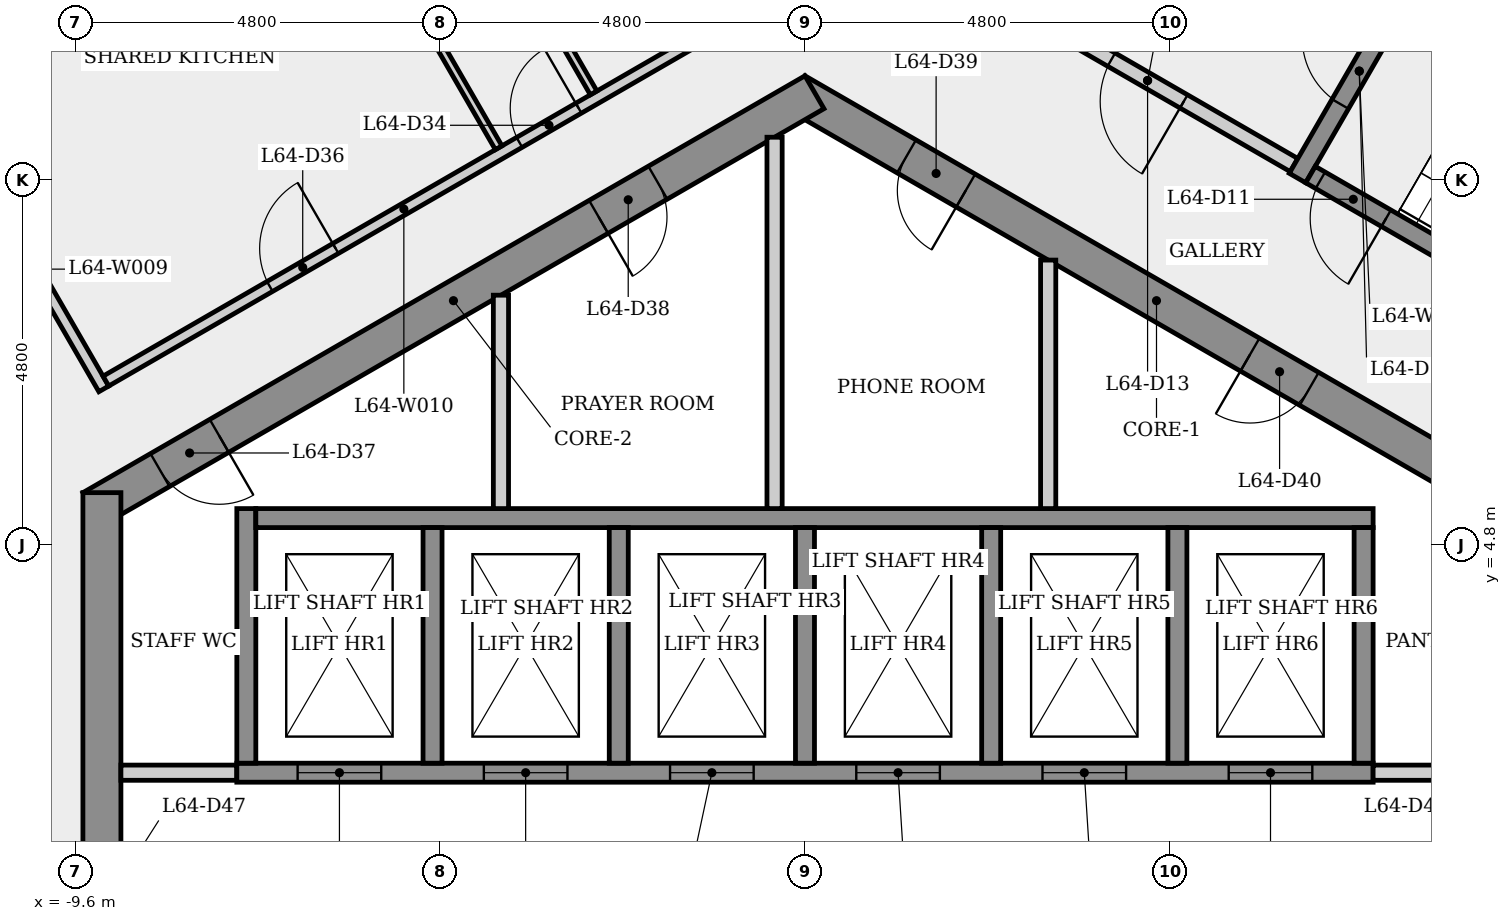
"""IFC4 building model, lengths in metres.
Left out: names, types, materials, properties, quantities, classifications, styles, units other than length and angle.
Written with IfcOpenShell. Run it as: python <this file> out.ifc"""

import sys

from ifc_helpers import new_model, si_unit, direction, frame, frame_2d, origin, place, context, subcontext, project, spatial, rectangle, extrude, element, fill, save


model = new_model("IFC4")
c1 = context("Model", 3, precision=1e-05, world=origin(), true_north=direction((0.0, 1.0)))
c2 = subcontext(c1, "Body", "Model", "MODEL_VIEW")
j1 = project(units=[si_unit("LENGTHUNIT", "METRE"), si_unit("PLANEANGLEUNIT", "RADIAN")], contexts=[c1])
p1 = place(None, origin())
s1 = spatial("IfcSite", under=j1, at=p1, CompositionType="ELEMENT")
p2 = place(p1, origin())
s2 = spatial("IfcBuilding", under=s1, at=p2, CompositionType="ELEMENT")
p3 = place(p2, frame((0.0, 0.0, 239.3)))
s3 = spatial("IfcBuildingStorey", under=s2, at=p3, CompositionType="ELEMENT", Elevation=239.3)
p4 = place(p3, frame((9.375, 5.268, 0.0), z_axis=(0.0, 0.0, 1.0), x_axis=(-0.866023993627, 0.500002442456, 0.0)))
e1 = element("IfcWall", 1, at=p4, inside=s3, PredefinedType="SHEAR", context=c2, shape_type="SweptSolid", body=[
    extrude(rectangle(XDim=10.97, YDim=0.5, at=frame_2d((5.485, 0.0))), origin(), (0.0, 0.0, 1.0), 3.4),
])
p5 = place(p4, frame((8.383, 0.0, 0.0)))
e2 = element("IfcOpeningElement", 2, at=p5, cuts=e1, PredefinedType="OPENING", context=c2, shape_type="SweptSolid", body=[
    extrude(rectangle(XDim=0.9, YDim=2.1, at=frame_2d((0.45, 1.05))), frame((0.0, 0.26, 0.0), z_axis=(0.0, -1.0, 0.0), x_axis=(1.0, 0.0, 0.0)), (0.0, 0.0, 1.0), 0.52),
])
p6 = place(p4, frame((3.165, 0.0, 0.0)))
e3 = element("IfcOpeningElement", 3, at=p6, cuts=e1, PredefinedType="OPENING", context=c2, shape_type="SweptSolid", body=[
    extrude(rectangle(XDim=0.9, YDim=2.1, at=frame_2d((0.45, 1.05))), frame((0.0, 0.26, 0.0), z_axis=(0.0, -1.0, 0.0), x_axis=(1.0, 0.0, 0.0)), (0.0, 0.0, 1.0), 0.52),
])
p7 = place(p3, frame((0.125, 10.753, 0.0), z_axis=(0.0, 0.0, 1.0), x_axis=(-0.866023993627, -0.500002442456, 0.0)))
e4 = element("IfcWall", 4, at=p7, inside=s3, PredefinedType="SHEAR", context=c2, shape_type="SweptSolid", body=[
    extrude(rectangle(XDim=10.97, YDim=0.5, at=frame_2d((5.485, 0.0))), origin(), (0.0, 0.0, 1.0), 3.4),
])
p8 = place(p7, frame((9.043, 0.0, 0.0)))
e5 = element("IfcOpeningElement", 5, at=p8, cuts=e4, PredefinedType="OPENING", context=c2, shape_type="SweptSolid", body=[
    extrude(rectangle(XDim=0.9, YDim=2.1, at=frame_2d((0.45, 1.05))), frame((0.0, 0.26, 0.0), z_axis=(0.0, -1.0, 0.0), x_axis=(1.0, 0.0, 0.0)), (0.0, 0.0, 1.0), 0.52),
])
p9 = place(p7, frame((2.38, 0.0, 0.0)))
e6 = element("IfcOpeningElement", 6, at=p9, cuts=e4, PredefinedType="OPENING", context=c2, shape_type="SweptSolid", body=[
    extrude(rectangle(XDim=0.9, YDim=2.1, at=frame_2d((0.45, 1.05))), frame((0.0, 0.26, 0.0), z_axis=(0.0, -1.0, 0.0), x_axis=(1.0, 0.0, 0.0)), (0.0, 0.0, 1.0), 0.52),
])
p10 = place(p3, frame((-9.25, 5.485, 0.0), z_axis=(0.0, 0.0, 1.0), x_axis=(0.0, -1.0, 0.0)))
e7 = element("IfcWall", 7, at=p10, inside=s3, PredefinedType="SHEAR", context=c2, shape_type="SweptSolid", body=[
    extrude(rectangle(XDim=10.97, YDim=0.5, at=frame_2d((5.485, 0.0))), origin(), (0.0, 0.0, 1.0), 3.4),
])
p11 = place(p10, frame((8.51, 0.0, 0.0)))
e8 = element("IfcOpeningElement", 8, at=p11, cuts=e7, PredefinedType="OPENING", context=c2, shape_type="SweptSolid", body=[
    extrude(rectangle(XDim=0.9, YDim=2.1, at=frame_2d((0.45, 1.05))), frame((0.0, 0.26, 0.0), z_axis=(0.0, -1.0, 0.0), x_axis=(1.0, 0.0, 0.0)), (0.0, 0.0, 1.0), 0.52),
])
p12 = place(p10, frame((4.685, 0.0, 0.0)))
e9 = element("IfcOpeningElement", 9, at=p12, cuts=e7, PredefinedType="OPENING", context=c2, shape_type="SweptSolid", body=[
    extrude(rectangle(XDim=1.6, YDim=2.1, at=frame_2d((0.8, 1.05))), frame((0.0, 0.26, 0.0), z_axis=(0.0, -1.0, 0.0), x_axis=(1.0, 0.0, 0.0)), (0.0, 0.0, 1.0), 0.52),
])
p13 = place(p3, frame((-11.044, 10.001, 0.0), z_axis=(0.0, 0.0, 1.0), x_axis=(0.500007048974, -0.866021334019, 0.0)))
e10 = element("IfcWall", 10, at=p13, inside=s3, PredefinedType="PARTITIONING", context=c2, shape_type="SweptSolid", body=[
    extrude(rectangle(XDim=3.639, YDim=0.15, at=frame_2d((1.819, 0.0))), origin(), (0.0, 0.0, 1.0), 3.05),
])
p14 = place(p3, frame((-9.198, 6.953, 0.0), z_axis=(0.0, 0.0, 1.0), x_axis=(0.866018971722, 0.500011140494, 0.0)))
e11 = element("IfcWall", 11, at=p14, inside=s3, PredefinedType="PARTITIONING", context=c2, shape_type="SweptSolid", body=[
    extrude(rectangle(XDim=9.053, YDim=0.15, at=frame_2d((4.526, 0.0))), origin(), (0.0, 0.0, 1.0), 3.05),
])
p15 = place(p14, frame((6.282, 0.0, 0.0)))
e12 = element("IfcOpeningElement", 12, at=p15, cuts=e11, PredefinedType="OPENING", context=c2, shape_type="SweptSolid", body=[
    extrude(rectangle(XDim=0.9, YDim=2.1, at=frame_2d((0.45, 1.05))), frame((0.0, 0.085, 0.0), z_axis=(0.0, -1.0, 0.0), x_axis=(1.0, 0.0, 0.0)), (0.0, 0.0, 1.0), 0.17),
])
p16 = place(p14, frame((2.49, 0.0, 0.0)))
e13 = element("IfcOpeningElement", 13, at=p16, cuts=e11, PredefinedType="OPENING", context=c2, shape_type="SweptSolid", body=[
    extrude(rectangle(XDim=1.0, YDim=2.1, at=frame_2d((0.5, 1.05))), frame((0.0, 0.085, 0.0), z_axis=(0.0, -1.0, 0.0), x_axis=(1.0, 0.0, 0.0)), (0.0, 0.0, 1.0), 0.17),
])
p17 = place(p3, frame((-9.0, 1.8, 0.0), z_axis=(0.0, 0.0, 1.0), x_axis=(1.0, 0.0, 0.0)))
e14 = element("IfcWall", 14, at=p17, inside=s3, PredefinedType="PARTITIONING", context=c2, shape_type="SweptSolid", body=[
    extrude(rectangle(XDim=1.525, YDim=0.2, at=frame_2d((0.763, 0.0))), origin(), (0.0, 0.0, 1.0), 3.05),
])
p18 = place(p3, frame((-7.475, 1.8, 0.0), z_axis=(0.0, 0.0, 1.0), x_axis=(1.0, 0.0, 0.0)))
e15 = element("IfcWall", 15, at=p18, inside=s3, PredefinedType="SHEAR", context=c2, shape_type="SweptSolid", body=[
    extrude(rectangle(XDim=14.95, YDim=0.25, at=frame_2d((7.475, 0.0))), origin(), (0.0, 0.0, 1.0), 3.05),
])
p19 = place(p18, frame((0.8, 0.0, 0.0)))
e16 = element("IfcOpeningElement", 16, at=p19, cuts=e15, PredefinedType="OPENING", context=c2, shape_type="SweptSolid", body=[
    extrude(rectangle(XDim=1.1, YDim=2.1, at=frame_2d((0.55, 1.05))), frame((0.0, 0.135, 0.0), z_axis=(0.0, -1.0, 0.0), x_axis=(1.0, 0.0, 0.0)), (0.0, 0.0, 1.0), 0.27),
])
p20 = place(p18, frame((3.25, 0.0, 0.0)))
e17 = element("IfcOpeningElement", 17, at=p20, cuts=e15, PredefinedType="OPENING", context=c2, shape_type="SweptSolid", body=[
    extrude(rectangle(XDim=1.1, YDim=2.1, at=frame_2d((0.55, 1.05))), frame((0.0, 0.135, 0.0), z_axis=(0.0, -1.0, 0.0), x_axis=(1.0, 0.0, 0.0)), (0.0, 0.0, 1.0), 0.27),
])
p21 = place(p18, frame((5.7, 0.0, 0.0)))
e18 = element("IfcOpeningElement", 18, at=p21, cuts=e15, PredefinedType="OPENING", context=c2, shape_type="SweptSolid", body=[
    extrude(rectangle(XDim=1.1, YDim=2.1, at=frame_2d((0.55, 1.05))), frame((0.0, 0.135, 0.0), z_axis=(0.0, -1.0, 0.0), x_axis=(1.0, 0.0, 0.0)), (0.0, 0.0, 1.0), 0.27),
])
p22 = place(p18, frame((8.15, 0.0, 0.0)))
e19 = element("IfcOpeningElement", 19, at=p22, cuts=e15, PredefinedType="OPENING", context=c2, shape_type="SweptSolid", body=[
    extrude(rectangle(XDim=1.1, YDim=2.1, at=frame_2d((0.55, 1.05))), frame((0.0, 0.135, 0.0), z_axis=(0.0, -1.0, 0.0), x_axis=(1.0, 0.0, 0.0)), (0.0, 0.0, 1.0), 0.27),
])
p23 = place(p18, frame((10.6, 0.0, 0.0)))
e20 = element("IfcOpeningElement", 20, at=p23, cuts=e15, PredefinedType="OPENING", context=c2, shape_type="SweptSolid", body=[
    extrude(rectangle(XDim=1.1, YDim=2.1, at=frame_2d((0.55, 1.05))), frame((0.0, 0.135, 0.0), z_axis=(0.0, -1.0, 0.0), x_axis=(1.0, 0.0, 0.0)), (0.0, 0.0, 1.0), 0.27),
])
p24 = place(p18, frame((13.05, 0.0, 0.0)))
e21 = element("IfcOpeningElement", 21, at=p24, cuts=e15, PredefinedType="OPENING", context=c2, shape_type="SweptSolid", body=[
    extrude(rectangle(XDim=1.1, YDim=2.1, at=frame_2d((0.55, 1.05))), frame((0.0, 0.135, 0.0), z_axis=(0.0, -1.0, 0.0), x_axis=(1.0, 0.0, 0.0)), (0.0, 0.0, 1.0), 0.27),
])
p25 = place(p3, frame((-7.35, 1.925, 0.0), z_axis=(0.0, 0.0, 1.0), x_axis=(0.0, 1.0, 0.0)))
e22 = element("IfcWall", 22, at=p25, inside=s3, PredefinedType="SHEAR", context=c2, shape_type="SweptSolid", body=[
    extrude(rectangle(XDim=3.35, YDim=0.25, at=frame_2d((1.675, 0.0))), origin(), (0.0, 0.0, 1.0), 3.05),
])
p26 = place(p3, frame((-7.225, 5.15, 0.0), z_axis=(0.0, 0.0, 1.0), x_axis=(1.0, 0.0, 0.0)))
e23 = element("IfcWall", 23, at=p26, inside=s3, PredefinedType="SHEAR", context=c2, shape_type="SweptSolid", body=[
    extrude(rectangle(XDim=14.7, YDim=0.25, at=frame_2d((7.35, 0.0))), origin(), (0.0, 0.0, 1.0), 3.05),
])
p27 = place(p3, frame((-4.9, 5.025, 0.0), z_axis=(0.0, 0.0, 1.0), x_axis=(0.0, -1.0, 0.0)))
e24 = element("IfcWall", 24, at=p27, inside=s3, PredefinedType="SHEAR", context=c2, shape_type="SweptSolid", body=[
    extrude(rectangle(XDim=3.1, YDim=0.25, at=frame_2d((1.55, 0.0))), origin(), (0.0, 0.0, 1.0), 3.4),
])
p28 = place(p3, frame((-4.168, 13.147, 0.0), z_axis=(0.0, 0.0, 1.0), x_axis=(0.499971228071, -0.866042014628, 0.0)))
e25 = element("IfcWall", 25, at=p28, inside=s3, PredefinedType="PARTITIONING", context=c2, shape_type="SweptSolid", body=[
    extrude(rectangle(XDim=2.775, YDim=0.1, at=frame_2d((1.388, 0.0))), origin(), (0.0, 0.0, 1.0), 3.05),
])
p29 = place(p28, frame((1.012, 0.0, 0.0)))
e26 = element("IfcOpeningElement", 26, at=p29, cuts=e25, PredefinedType="OPENING", context=c2, shape_type="SweptSolid", body=[
    extrude(rectangle(XDim=0.8, YDim=2.1, at=frame_2d((0.4, 1.05))), frame((0.0, 0.06, 0.0), z_axis=(0.0, -1.0, 0.0), x_axis=(1.0, 0.0, 0.0)), (0.0, 0.0, 1.0), 0.12),
])
p30 = place(p3, frame((-4.0, 8.083, 0.0), z_axis=(0.0, 0.0, 1.0), x_axis=(0.0, -1.0, 0.0)))
e27 = element("IfcWall", 27, at=p30, inside=s3, PredefinedType="PARTITIONING", context=c2, shape_type="SweptSolid", body=[
    extrude(rectangle(XDim=2.808, YDim=0.2, at=frame_2d((1.404, 0.0))), origin(), (0.0, 0.0, 1.0), 3.05),
])
p31 = place(p3, frame((-4.03, 10.023, 0.0), z_axis=(0.0, 0.0, 1.0), x_axis=(-0.499980681017, 0.866036557317, 0.0)))
e28 = element("IfcWall", 28, at=p31, inside=s3, PredefinedType="PARTITIONING", context=c2, shape_type="SweptSolid", body=[
    extrude(rectangle(XDim=6.193, YDim=0.1, at=frame_2d((3.096, 0.0))), origin(), (0.0, 0.0, 1.0), 3.05),
])
p32 = place(p3, frame((-2.45, 5.025, 0.0), z_axis=(0.0, 0.0, 1.0), x_axis=(0.0, -1.0, 0.0)))
e29 = element("IfcWall", 29, at=p32, inside=s3, PredefinedType="SHEAR", context=c2, shape_type="SweptSolid", body=[
    extrude(rectangle(XDim=3.1, YDim=0.25, at=frame_2d((1.55, 0.0))), origin(), (0.0, 0.0, 1.0), 3.4),
])
p33 = place(p3, frame((-0.4, 10.161, 0.0), z_axis=(0.0, 0.0, 1.0), x_axis=(0.0, -1.0, 0.0)))
e30 = element("IfcWall", 30, at=p33, inside=s3, PredefinedType="PARTITIONING", context=c2, shape_type="SweptSolid", body=[
    extrude(rectangle(XDim=4.886, YDim=0.2, at=frame_2d((2.443, 0.0))), origin(), (0.0, 0.0, 1.0), 3.05),
])
for number, where, z_axis, x_axis in (
    (31, (0.0, 5.025, 0.0), (0.0, 0.0, 1.0), (0.0, -1.0, 0.0)),
    (32, (2.45, 5.025, 0.0), (0.0, 0.0, 1.0), (0.0, -1.0, 0.0)),
):
    element("IfcWall", number, at=place(p3, frame(where, z_axis=z_axis, x_axis=x_axis)), inside=s3, PredefinedType="SHEAR", context=c2, shape_type="SweptSolid", body=[
        extrude(rectangle(XDim=3.1, YDim=0.25, at=frame_2d((1.55, 0.0))), origin(), (0.0, 0.0, 1.0), 3.4),
    ])
p34 = place(p3, frame((3.2, 8.545, 0.0), z_axis=(0.0, 0.0, 1.0), x_axis=(0.0, -1.0, 0.0)))
e33 = element("IfcWall", 33, at=p34, inside=s3, PredefinedType="PARTITIONING", context=c2, shape_type="SweptSolid", body=[
    extrude(rectangle(XDim=3.27, YDim=0.2, at=frame_2d((1.635, 0.0))), origin(), (0.0, 0.0, 1.0), 3.05),
])
p35 = place(p3, frame((4.9, 5.025, 0.0), z_axis=(0.0, 0.0, 1.0), x_axis=(0.0, -1.0, 0.0)))
e34 = element("IfcWall", 34, at=p35, inside=s3, PredefinedType="SHEAR", context=c2, shape_type="SweptSolid", body=[
    extrude(rectangle(XDim=3.1, YDim=0.25, at=frame_2d((1.55, 0.0))), origin(), (0.0, 0.0, 1.0), 3.4),
])
p36 = place(p3, frame((6.435, 9.795, 0.0), z_axis=(0.0, 0.0, 1.0), x_axis=(-0.866012907634, 0.500021643343, 0.0)))
e35 = element("IfcWall", 35, at=p36, inside=s3, PredefinedType="PARTITIONING", context=c2, shape_type="SweptSolid", body=[
    extrude(rectangle(XDim=4.45, YDim=0.2, at=frame_2d((2.225, 0.0))), origin(), (0.0, 0.0, 1.0), 3.05),
])
p37 = place(p36, frame((1.675, 0.0, 0.0)))
e36 = element("IfcOpeningElement", 36, at=p37, cuts=e35, PredefinedType="OPENING", context=c2, shape_type="SweptSolid", body=[
    extrude(rectangle(XDim=1.1, YDim=2.1, at=frame_2d((0.55, 1.05))), frame((0.0, 0.11, 0.0), z_axis=(0.0, -1.0, 0.0), x_axis=(1.0, 0.0, 0.0)), (0.0, 0.0, 1.0), 0.22),
])
p38 = place(p3, frame((6.48, 9.624, 0.0), z_axis=(0.0, 0.0, 1.0), x_axis=(0.500017246033, 0.866015446554, 0.0)))
e37 = element("IfcWall", 37, at=p38, inside=s3, PredefinedType="SHEAR", context=c2, shape_type="SweptSolid", body=[
    extrude(rectangle(XDim=3.25, YDim=0.25, at=frame_2d((1.625, 0.0))), origin(), (0.0, 0.0, 1.0), 3.05),
])
p39 = place(p38, frame((1.125, 0.0, 0.0)))
e38 = element("IfcOpeningElement", 38, at=p39, cuts=e37, PredefinedType="OPENING", context=c2, shape_type="SweptSolid", body=[
    extrude(rectangle(XDim=1.0, YDim=2.1, at=frame_2d((0.5, 1.05))), frame((0.0, 0.135, 0.0), z_axis=(0.0, -1.0, 0.0), x_axis=(1.0, 0.0, 0.0)), (0.0, 0.0, 1.0), 0.27),
])
p40 = place(p3, frame((7.475, 1.8, 0.0), z_axis=(0.0, 0.0, 1.0), x_axis=(1.0, 0.0, 0.0)))
e39 = element("IfcWall", 39, at=p40, inside=s3, PredefinedType="PARTITIONING", context=c2, shape_type="SweptSolid", body=[
    extrude(rectangle(XDim=1.525, YDim=0.2, at=frame_2d((0.763, 0.0))), origin(), (0.0, 0.0, 1.0), 3.05),
])
p41 = place(p3, frame((7.35, 5.025, 0.0), z_axis=(0.0, 0.0, 1.0), x_axis=(0.0, -1.0, 0.0)))
e40 = element("IfcWall", 40, at=p41, inside=s3, PredefinedType="SHEAR", context=c2, shape_type="SweptSolid", body=[
    extrude(rectangle(XDim=3.1, YDim=0.25, at=frame_2d((1.55, 0.0))), origin(), (0.0, 0.0, 1.0), 3.4),
])
p42 = place(p3, frame((8.151, 12.268, 0.0), z_axis=(0.0, 0.0, 1.0), x_axis=(0.866025499775, -0.499999833739, 0.0)))
e41 = element("IfcWall", 41, at=p42, inside=s3, PredefinedType="SHEAR", context=c2, shape_type="SweptSolid", body=[
    extrude(rectangle(XDim=6.4, YDim=0.25, at=frame_2d((3.2, 0.0))), origin(), (0.0, 0.0, 1.0), 3.05),
])
p43 = place(p3, frame((12.194, 6.47, 0.0), z_axis=(0.0, 0.0, 1.0), x_axis=(-0.866025499775, 0.499999833739, 0.0)))
e42 = element("IfcWall", 42, at=p43, inside=s3, PredefinedType="SHEAR", context=c2, shape_type="SweptSolid", body=[
    extrude(rectangle(XDim=6.4, YDim=0.25, at=frame_2d((3.2, 0.0))), origin(), (0.0, 0.0, 1.0), 3.05),
])
p44 = place(p43, frame((5.25, 0.0, 0.0)))
e43 = element("IfcOpeningElement", 43, at=p44, cuts=e42, PredefinedType="OPENING", context=c2, shape_type="SweptSolid", body=[
    extrude(rectangle(XDim=1.0, YDim=2.1, at=frame_2d((0.5, 1.05))), frame((0.0, 0.135, 0.0), z_axis=(0.0, -1.0, 0.0), x_axis=(1.0, 0.0, 0.0)), (0.0, 0.0, 1.0), 0.27),
])
p45 = place(p19, origin())
e44 = element("IfcDoor", 44, at=p45, inside=s3, OperationType="SLIDING_TO_LEFT", PredefinedType="DOOR", context=c2, shape_type="SweptSolid", body=[
    extrude(rectangle(XDim=1.1, YDim=2.1, at=frame_2d((0.55, 1.05))), frame((0.0, 0.025, 0.0), z_axis=(0.0, -1.0, 0.0), x_axis=(1.0, 0.0, 0.0)), (0.0, 0.0, 1.0), 0.05),
])
fill(e16, e44)
p46 = place(p20, origin())
e45 = element("IfcDoor", 45, at=p46, inside=s3, OperationType="SLIDING_TO_LEFT", PredefinedType="DOOR", context=c2, shape_type="SweptSolid", body=[
    extrude(rectangle(XDim=1.1, YDim=2.1, at=frame_2d((0.55, 1.05))), frame((0.0, 0.025, 0.0), z_axis=(0.0, -1.0, 0.0), x_axis=(1.0, 0.0, 0.0)), (0.0, 0.0, 1.0), 0.05),
])
fill(e17, e45)
p47 = place(p21, origin())
e46 = element("IfcDoor", 46, at=p47, inside=s3, OperationType="SLIDING_TO_LEFT", PredefinedType="DOOR", context=c2, shape_type="SweptSolid", body=[
    extrude(rectangle(XDim=1.1, YDim=2.1, at=frame_2d((0.55, 1.05))), frame((0.0, 0.025, 0.0), z_axis=(0.0, -1.0, 0.0), x_axis=(1.0, 0.0, 0.0)), (0.0, 0.0, 1.0), 0.05),
])
fill(e18, e46)
p48 = place(p22, origin())
e47 = element("IfcDoor", 47, at=p48, inside=s3, OperationType="SLIDING_TO_LEFT", PredefinedType="DOOR", context=c2, shape_type="SweptSolid", body=[
    extrude(rectangle(XDim=1.1, YDim=2.1, at=frame_2d((0.55, 1.05))), frame((0.0, 0.025, 0.0), z_axis=(0.0, -1.0, 0.0), x_axis=(1.0, 0.0, 0.0)), (0.0, 0.0, 1.0), 0.05),
])
fill(e19, e47)
p49 = place(p23, origin())
e48 = element("IfcDoor", 48, at=p49, inside=s3, OperationType="SLIDING_TO_LEFT", PredefinedType="DOOR", context=c2, shape_type="SweptSolid", body=[
    extrude(rectangle(XDim=1.1, YDim=2.1, at=frame_2d((0.55, 1.05))), frame((0.0, 0.025, 0.0), z_axis=(0.0, -1.0, 0.0), x_axis=(1.0, 0.0, 0.0)), (0.0, 0.0, 1.0), 0.05),
])
fill(e20, e48)
p50 = place(p24, origin())
e49 = element("IfcDoor", 49, at=p50, inside=s3, OperationType="SLIDING_TO_LEFT", PredefinedType="DOOR", context=c2, shape_type="SweptSolid", body=[
    extrude(rectangle(XDim=1.1, YDim=2.1, at=frame_2d((0.55, 1.05))), frame((0.0, 0.025, 0.0), z_axis=(0.0, -1.0, 0.0), x_axis=(1.0, 0.0, 0.0)), (0.0, 0.0, 1.0), 0.05),
])
fill(e21, e49)
p51 = place(p44, origin())
e50 = element("IfcDoor", 50, at=p51, inside=s3, OperationType="SINGLE_SWING_LEFT", PredefinedType="DOOR", context=c2, shape_type="SweptSolid", body=[
    extrude(rectangle(XDim=1.0, YDim=2.1, at=frame_2d((0.5, 1.05))), frame((0.0, 0.025, 0.0), z_axis=(0.0, -1.0, 0.0), x_axis=(1.0, 0.0, 0.0)), (0.0, 0.0, 1.0), 0.05),
])
fill(e43, e50)
p52 = place(p39, origin())
e51 = element("IfcDoor", 51, at=p52, inside=s3, OperationType="SINGLE_SWING_RIGHT", PredefinedType="DOOR", context=c2, shape_type="SweptSolid", body=[
    extrude(rectangle(XDim=1.0, YDim=2.1, at=frame_2d((0.5, 1.05))), frame((0.0, 0.025, 0.0), z_axis=(0.0, -1.0, 0.0), x_axis=(1.0, 0.0, 0.0)), (0.0, 0.0, 1.0), 0.05),
])
fill(e38, e51)
p53 = place(p37, origin())
e52 = element("IfcDoor", 52, at=p53, inside=s3, OperationType="SINGLE_SWING_LEFT", PredefinedType="DOOR", context=c2, shape_type="SweptSolid", body=[
    extrude(rectangle(XDim=1.1, YDim=2.1, at=frame_2d((0.55, 1.05))), frame((0.0, 0.025, 0.0), z_axis=(0.0, -1.0, 0.0), x_axis=(1.0, 0.0, 0.0)), (0.0, 0.0, 1.0), 0.05),
])
fill(e36, e52)
p54 = place(p15, origin())
e53 = element("IfcDoor", 53, at=p54, inside=s3, OperationType="SINGLE_SWING_RIGHT", PredefinedType="DOOR", context=c2, shape_type="SweptSolid", body=[
    extrude(rectangle(XDim=0.9, YDim=2.1, at=frame_2d((0.45, 1.05))), frame((0.0, 0.025, 0.0), z_axis=(0.0, -1.0, 0.0), x_axis=(1.0, 0.0, 0.0)), (0.0, 0.0, 1.0), 0.05),
])
fill(e12, e53)
p55 = place(p16, origin())
e54 = element("IfcDoor", 54, at=p55, inside=s3, OperationType="SINGLE_SWING_RIGHT", PredefinedType="DOOR", context=c2, shape_type="SweptSolid", body=[
    extrude(rectangle(XDim=1.0, YDim=2.1, at=frame_2d((0.5, 1.05))), frame((0.0, 0.025, 0.0), z_axis=(0.0, -1.0, 0.0), x_axis=(1.0, 0.0, 0.0)), (0.0, 0.0, 1.0), 0.05),
])
fill(e13, e54)
p56 = place(p8, origin())
e55 = element("IfcDoor", 55, at=p56, inside=s3, OperationType="SINGLE_SWING_LEFT", PredefinedType="DOOR", context=c2, shape_type="SweptSolid", body=[
    extrude(rectangle(XDim=0.9, YDim=2.1, at=frame_2d((0.45, 1.05))), frame((0.0, 0.025, 0.0), z_axis=(0.0, -1.0, 0.0), x_axis=(1.0, 0.0, 0.0)), (0.0, 0.0, 1.0), 0.05),
])
fill(e5, e55)
p57 = place(p9, origin())
e56 = element("IfcDoor", 56, at=p57, inside=s3, OperationType="SINGLE_SWING_RIGHT", PredefinedType="DOOR", context=c2, shape_type="SweptSolid", body=[
    extrude(rectangle(XDim=0.9, YDim=2.1, at=frame_2d((0.45, 1.05))), frame((0.0, 0.025, 0.0), z_axis=(0.0, -1.0, 0.0), x_axis=(1.0, 0.0, 0.0)), (0.0, 0.0, 1.0), 0.05),
])
fill(e6, e56)
p58 = place(p5, origin())
e57 = element("IfcDoor", 57, at=p58, inside=s3, OperationType="SINGLE_SWING_LEFT", PredefinedType="DOOR", context=c2, shape_type="SweptSolid", body=[
    extrude(rectangle(XDim=0.9, YDim=2.1, at=frame_2d((0.45, 1.05))), frame((0.0, 0.025, 0.0), z_axis=(0.0, -1.0, 0.0), x_axis=(1.0, 0.0, 0.0)), (0.0, 0.0, 1.0), 0.05),
])
fill(e2, e57)
p59 = place(p6, origin())
e58 = element("IfcDoor", 58, at=p59, inside=s3, OperationType="SINGLE_SWING_RIGHT", PredefinedType="DOOR", context=c2, shape_type="SweptSolid", body=[
    extrude(rectangle(XDim=0.9, YDim=2.1, at=frame_2d((0.45, 1.05))), frame((0.0, 0.025, 0.0), z_axis=(0.0, -1.0, 0.0), x_axis=(1.0, 0.0, 0.0)), (0.0, 0.0, 1.0), 0.05),
])
fill(e3, e58)
save(model, sys.argv[1])
